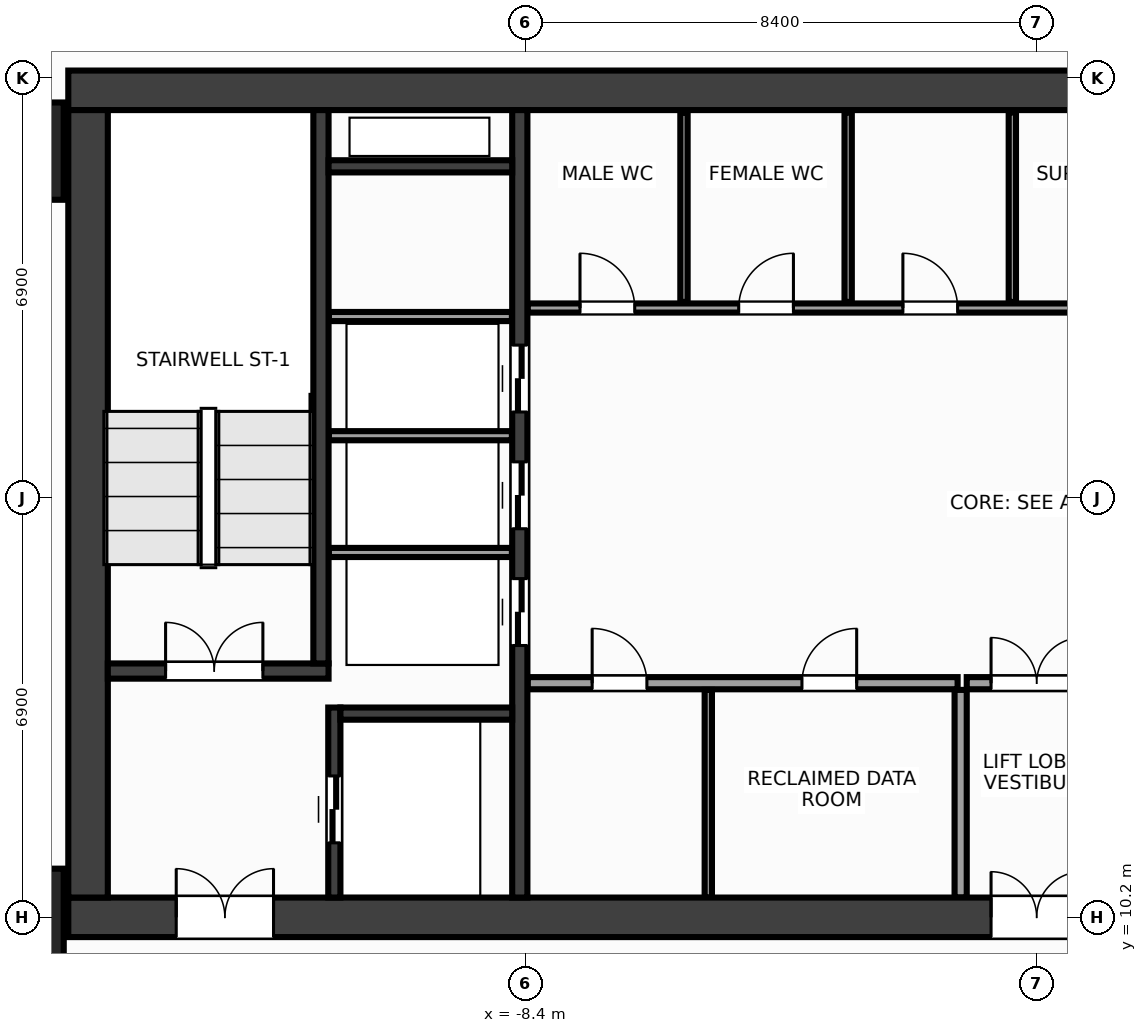
"""IFC4 building model, lengths in metres.
Left out: names, types, materials, properties, quantities, classifications, styles, units other than length and angle.
Written with IfcOpenShell. Run it as: python <this file> out.ifc"""

import sys

from ifc_helpers import new_model, si_unit, direction, frame, frame_2d, origin, origin_2d, place, context, subcontext, project, spatial, rectangle, extrude, source, transform, mapped, element, fill, save


model = new_model("IFC4")
c1 = context("Model", 3, precision=1e-05, world=origin(), true_north=direction((0.0, 1.0)))
c2 = subcontext(c1, "Body", "Model", "MODEL_VIEW")
j1 = project(units=[si_unit("LENGTHUNIT", "METRE"), si_unit("PLANEANGLEUNIT", "RADIAN")], contexts=[c1])
p1 = place(None, origin())
s1 = spatial("IfcSite", under=j1, at=p1, CompositionType="ELEMENT")
p2 = place(p1, origin())
s2 = spatial("IfcBuilding", under=s1, at=p2, CompositionType="ELEMENT")
p3 = place(p2, frame((0.0, 0.0, 138.8)))
s3 = spatial("IfcBuildingStorey", under=s2, at=p3, CompositionType="ELEMENT", Elevation=138.8)
m1 = source(origin(), c2, "Body", "SweptSolid", [
    extrude(rectangle(XDim=31.85, YDim=0.65, at=frame_2d((15.925, 0.0))), origin(), (0.0, 0.0, 1.0), 3.6),
])
p4 = place(p3, frame((-15.925, 23.8, 0.0), z_axis=(0.0, 0.0, 1.0), x_axis=(1.0, 0.0, 0.0)))
e1 = element("IfcWall", 1, at=p4, inside=s3, PredefinedType="SHEAR", context=c2, shape_type="MappedRepresentation", body=[
    mapped(m1, transform((0.0, 0.0, 0.0), x_axis=(1.0, 0.0, 0.0), y_axis=(0.0, 1.0, 0.0), z_axis=(0.0, 0.0, 1.0), scale=1.0)),
])
p5 = place(p3, frame((-15.925, 10.2, 0.0), z_axis=(0.0, 0.0, 1.0), x_axis=(1.0, 0.0, 0.0)))
e2 = element("IfcWall", 2, at=p5, inside=s3, PredefinedType="SHEAR", context=c2, shape_type="MappedRepresentation", body=[
    mapped(m1, transform((0.0, 0.0, 0.0), x_axis=(1.0, 0.0, 0.0), y_axis=(0.0, 1.0, 0.0), z_axis=(0.0, 0.0, 1.0), scale=1.0)),
])
p6 = place(p5, frame((1.775, 0.0, 0.0)))
e3 = element("IfcOpeningElement", 3, at=p6, cuts=e2, PredefinedType="OPENING", context=c2, shape_type="SweptSolid", body=[
    extrude(rectangle(XDim=1.6, YDim=2.15, at=frame_2d((0.8, 1.075))), frame((0.0, 0.337, 0.0), z_axis=(0.0, -1.0, 0.0), x_axis=(1.0, 0.0, 0.0)), (0.0, 0.0, 1.0), 0.674),
])
p7 = place(p5, frame((28.475, 0.0, 0.0)))
e4 = element("IfcOpeningElement", 4, at=p7, cuts=e2, PredefinedType="OPENING", context=c2, shape_type="SweptSolid", body=[
    extrude(rectangle(XDim=1.6, YDim=2.15, at=frame_2d((0.8, 1.075))), frame((0.0, 0.337, 0.0), z_axis=(0.0, -1.0, 0.0), x_axis=(1.0, 0.0, 0.0)), (0.0, 0.0, 1.0), 0.674),
])
p8 = place(p5, frame((15.175, 0.0, 0.0)))
e5 = element("IfcOpeningElement", 5, at=p8, cuts=e2, PredefinedType="OPENING", context=c2, shape_type="SweptSolid", body=[
    extrude(rectangle(XDim=1.5, YDim=2.2, at=frame_2d((0.75, 1.1))), frame((0.0, 0.337, 0.0), z_axis=(0.0, -1.0, 0.0), x_axis=(1.0, 0.0, 0.0)), (0.0, 0.0, 1.0), 0.674),
])
m2 = source(origin(), c2, "Body", "SweptSolid", [
    extrude(rectangle(XDim=12.95, YDim=0.65, at=frame_2d((6.475, 0.0))), origin(), (0.0, 0.0, 1.0), 3.6),
])
p9 = place(p3, frame((-15.6, 10.525, 0.0), z_axis=(0.0, 0.0, 1.0), x_axis=(0.0, 1.0, 0.0)))
e6 = element("IfcWall", 6, at=p9, inside=s3, PredefinedType="SHEAR", context=c2, shape_type="MappedRepresentation", body=[
    mapped(m2, transform((0.0, 0.0, 0.0), x_axis=(1.0, 0.0, 0.0), y_axis=(0.0, 1.0, 0.0), z_axis=(0.0, 0.0, 1.0), scale=1.0)),
])
m3 = source(origin(), c2, "Body", "SweptSolid", [
    extrude(rectangle(XDim=12.95, YDim=0.25, at=frame_2d((6.475, 0.0))), origin(), (0.0, 0.0, 1.0), 3.6),
])
p10 = place(p3, frame((-8.5, 10.525, 0.0), z_axis=(0.0, 0.0, 1.0), x_axis=(0.0, 1.0, 0.0)))
e7 = element("IfcWall", 7, at=p10, inside=s3, PredefinedType="SHEAR", context=c2, shape_type="MappedRepresentation", body=[
    mapped(m3, transform((0.0, 0.0, 0.0), x_axis=(1.0, 0.0, 0.0), y_axis=(0.0, 1.0, 0.0), z_axis=(0.0, 0.0, 1.0), scale=1.0)),
])
p11 = place(p10, frame((4.145, 0.0, 0.0)))
e8 = element("IfcOpeningElement", 8, at=p11, cuts=e7, PredefinedType="OPENING", context=c2, shape_type="SweptSolid", body=[
    extrude(rectangle(XDim=1.1, YDim=2.15, at=frame_2d((0.55, 1.075))), frame((0.0, 0.137, 0.0), z_axis=(0.0, -1.0, 0.0), x_axis=(1.0, 0.0, 0.0)), (0.0, 0.0, 1.0), 0.274),
])
p12 = place(p10, frame((6.065, 0.0, 0.0)))
e9 = element("IfcOpeningElement", 9, at=p12, cuts=e7, PredefinedType="OPENING", context=c2, shape_type="SweptSolid", body=[
    extrude(rectangle(XDim=1.1, YDim=2.15, at=frame_2d((0.55, 1.075))), frame((0.0, 0.137, 0.0), z_axis=(0.0, -1.0, 0.0), x_axis=(1.0, 0.0, 0.0)), (0.0, 0.0, 1.0), 0.274),
])
p13 = place(p10, frame((7.985, 0.0, 0.0)))
e10 = element("IfcOpeningElement", 10, at=p13, cuts=e7, PredefinedType="OPENING", context=c2, shape_type="SweptSolid", body=[
    extrude(rectangle(XDim=1.1, YDim=2.15, at=frame_2d((0.55, 1.075))), frame((0.0, 0.137, 0.0), z_axis=(0.0, -1.0, 0.0), x_axis=(1.0, 0.0, 0.0)), (0.0, 0.0, 1.0), 0.274),
])
m4 = source(origin(), c2, "Body", "SweptSolid", [
    extrude(rectangle(XDim=3.63, YDim=0.25, at=frame_2d((1.815, 0.0))), origin(), (0.0, 0.0, 1.0), 3.6),
])
p14 = place(p3, frame((-15.275, 14.25, 0.0), z_axis=(0.0, 0.0, 1.0), x_axis=(1.0, 0.0, 0.0)))
e11 = element("IfcWall", 11, at=p14, inside=s3, PredefinedType="SHEAR", context=c2, shape_type="MappedRepresentation", body=[
    mapped(m4, transform((0.0, 0.0, 0.0), x_axis=(1.0, 0.0, 0.0), y_axis=(0.0, 1.0, 0.0), z_axis=(0.0, 0.0, 1.0), scale=1.0)),
])
p15 = place(p14, frame((0.95, 0.0, 0.0)))
e12 = element("IfcOpeningElement", 12, at=p15, cuts=e11, PredefinedType="OPENING", context=c2, shape_type="SweptSolid", body=[
    extrude(rectangle(XDim=1.6, YDim=2.15, at=frame_2d((0.8, 1.075))), frame((0.0, 0.137, 0.0), z_axis=(0.0, -1.0, 0.0), x_axis=(1.0, 0.0, 0.0)), (0.0, 0.0, 1.0), 0.274),
])
m5 = source(origin(), c2, "Body", "SweptSolid", [
    extrude(rectangle(XDim=9.1, YDim=0.25, at=frame_2d((4.55, 0.0))), origin(), (0.0, 0.0, 1.0), 3.6),
])
p16 = place(p3, frame((-11.77, 14.375, 0.0), z_axis=(0.0, 0.0, 1.0), x_axis=(0.0, 1.0, 0.0)))
e13 = element("IfcWall", 13, at=p16, inside=s3, PredefinedType="SHEAR", context=c2, shape_type="MappedRepresentation", body=[
    mapped(m5, transform((0.0, 0.0, 0.0), x_axis=(1.0, 0.0, 0.0), y_axis=(0.0, 1.0, 0.0), z_axis=(0.0, 0.0, 1.0), scale=1.0)),
])
m6 = source(origin(), c2, "Body", "SweptSolid", [
    extrude(rectangle(XDim=3.125, YDim=0.2, at=frame_2d((1.562, 0.0))), origin(), (0.0, 0.0, 1.0), 3.6),
])
p17 = place(p3, frame((-11.55, 10.525, 0.0), z_axis=(0.0, 0.0, 1.0), x_axis=(0.0, 1.0, 0.0)))
e14 = element("IfcWall", 14, at=p17, inside=s3, PredefinedType="SHEAR", context=c2, shape_type="MappedRepresentation", body=[
    mapped(m6, transform((0.0, 0.0, 0.0), x_axis=(1.0, 0.0, 0.0), y_axis=(0.0, 1.0, 0.0), z_axis=(0.0, 0.0, 1.0), scale=1.0)),
])
p18 = place(p17, frame((0.9, 0.0, 0.0)))
e15 = element("IfcOpeningElement", 15, at=p18, cuts=e14, PredefinedType="OPENING", context=c2, shape_type="SweptSolid", body=[
    extrude(rectangle(XDim=1.1, YDim=2.15, at=frame_2d((0.55, 1.075))), frame((0.0, 0.112, 0.0), z_axis=(0.0, -1.0, 0.0), x_axis=(1.0, 0.0, 0.0)), (0.0, 0.0, 1.0), 0.224),
])
m7 = source(origin(), c2, "Body", "SweptSolid", [
    extrude(rectangle(XDim=2.825, YDim=0.2, at=frame_2d((1.413, 0.0))), origin(), (0.0, 0.0, 1.0), 3.6),
])
p19 = place(p3, frame((-11.45, 13.55, 0.0), z_axis=(0.0, 0.0, 1.0), x_axis=(1.0, 0.0, 0.0)))
e16 = element("IfcWall", 16, at=p19, inside=s3, PredefinedType="SHEAR", context=c2, shape_type="MappedRepresentation", body=[
    mapped(m7, transform((0.0, 0.0, 0.0), x_axis=(1.0, 0.0, 0.0), y_axis=(0.0, 1.0, 0.0), z_axis=(0.0, 0.0, 1.0), scale=1.0)),
])
m8 = source(origin(), c2, "Body", "SweptSolid", [
    extrude(rectangle(XDim=3.02, YDim=0.2, at=frame_2d((1.51, 0.0))), origin(), (0.0, 0.0, 1.0), 3.6),
])
p20 = place(p3, frame((-11.645, 22.55, 0.0), z_axis=(0.0, 0.0, 1.0), x_axis=(1.0, 0.0, 0.0)))
e17 = element("IfcWall", 17, at=p20, inside=s3, PredefinedType="SHEAR", context=c2, shape_type="MappedRepresentation", body=[
    mapped(m8, transform((0.0, 0.0, 0.0), x_axis=(1.0, 0.0, 0.0), y_axis=(0.0, 1.0, 0.0), z_axis=(0.0, 0.0, 1.0), scale=1.0)),
])
m9 = source(origin(), c2, "Body", "SweptSolid", [
    extrude(rectangle(XDim=1.6, YDim=1.6, at=origin_2d()), origin(), (0.0, 0.0, 1.0), 3.6),
])
for number, where, z_axis, x_axis in (
    (18, (-16.8, 10.2, 0.0), (0.0, 0.0, 1.0), (1.0, 0.0, 0.0)),
    (19, (-16.8, 22.8, 0.0), (0.0, 0.0, 1.0), (1.0, 0.0, 0.0)),
):
    element("IfcColumn", number, at=place(p3, frame(where, z_axis=z_axis, x_axis=x_axis)), inside=s3, PredefinedType="COLUMN", context=c2, shape_type="MappedRepresentation", body=[
        mapped(m9, transform((0.0, 0.0, 0.0), x_axis=(1.0, 0.0, 0.0), y_axis=(0.0, 1.0, 0.0), z_axis=(0.0, 0.0, 1.0), scale=1.0)),
    ])
m10 = source(origin(), c2, "Body", "SweptSolid", [
    extrude(rectangle(XDim=3.01, YDim=0.15, at=frame_2d((1.505, 0.0))), origin(), (0.0, 0.0, 1.0), 3.38),
])
for number, where, z_axis, x_axis in (
    (20, (-11.64, 16.2, 0.0), (0.0, 0.0, 1.0), (1.0, 0.0, 0.0)),
    (21, (-11.64, 18.12, 0.0), (0.0, 0.0, 1.0), (1.0, 0.0, 0.0)),
    (22, (-11.64, 20.08, 0.0), (0.0, 0.0, 1.0), (1.0, 0.0, 0.0)),
):
    element("IfcWall", number, at=place(p3, frame(where, z_axis=z_axis, x_axis=x_axis)), inside=s3, PredefinedType="PARTITIONING", context=c2, shape_type="MappedRepresentation", body=[
        mapped(m10, transform((0.0, 0.0, 0.0), x_axis=(1.0, 0.0, 0.0), y_axis=(0.0, 1.0, 0.0), z_axis=(0.0, 0.0, 1.0), scale=1.0)),
    ])
m11 = source(origin(), c2, "Body", "SweptSolid", [
    extrude(rectangle(XDim=7.07, YDim=0.2, at=frame_2d((3.535, 0.0))), origin(), (0.0, 0.0, 1.0), 3.38),
])
p21 = place(p3, frame((-8.37, 14.05, 0.0), z_axis=(0.0, 0.0, 1.0), x_axis=(1.0, 0.0, 0.0)))
e23 = element("IfcWall", 23, at=p21, inside=s3, PredefinedType="PARTITIONING", context=c2, shape_type="MappedRepresentation", body=[
    mapped(m11, transform((0.0, 0.0, 0.0), x_axis=(1.0, 0.0, 0.0), y_axis=(0.0, 1.0, 0.0), z_axis=(0.0, 0.0, 1.0), scale=1.0)),
])
p22 = place(p21, frame((1.06, 0.0, 0.0)))
e24 = element("IfcOpeningElement", 24, at=p22, cuts=e23, PredefinedType="OPENING", context=c2, shape_type="SweptSolid", body=[
    extrude(rectangle(XDim=0.9, YDim=2.15, at=frame_2d((0.45, 1.075))), frame((0.0, 0.112, 0.0), z_axis=(0.0, -1.0, 0.0), x_axis=(1.0, 0.0, 0.0)), (0.0, 0.0, 1.0), 0.224),
])
p23 = place(p21, frame((4.51, 0.0, 0.0)))
e25 = element("IfcOpeningElement", 25, at=p23, cuts=e23, PredefinedType="OPENING", context=c2, shape_type="SweptSolid", body=[
    extrude(rectangle(XDim=0.9, YDim=2.15, at=frame_2d((0.45, 1.075))), frame((0.0, 0.112, 0.0), z_axis=(0.0, -1.0, 0.0), x_axis=(1.0, 0.0, 0.0)), (0.0, 0.0, 1.0), 0.224),
])
m12 = source(origin(), c2, "Body", "SweptSolid", [
    extrude(rectangle(XDim=3.415, YDim=0.2, at=frame_2d((1.708, 0.0))), origin(), (0.0, 0.0, 1.0), 3.38),
])
p24 = place(p3, frame((-1.25, 10.525, 0.0), z_axis=(0.0, 0.0, 1.0), x_axis=(0.0, 1.0, 0.0)))
e26 = element("IfcWall", 26, at=p24, inside=s3, PredefinedType="PARTITIONING", context=c2, shape_type="MappedRepresentation", body=[
    mapped(m12, transform((0.0, 0.0, 0.0), x_axis=(1.0, 0.0, 0.0), y_axis=(0.0, 1.0, 0.0), z_axis=(0.0, 0.0, 1.0), scale=1.0)),
])
m13 = source(origin(), c2, "Body", "SweptSolid", [
    extrude(rectangle(XDim=2.3, YDim=0.2, at=frame_2d((1.15, 0.0))), origin(), (0.0, 0.0, 1.0), 3.38),
])
p25 = place(p3, frame((-1.15, 14.05, 0.0), z_axis=(0.0, 0.0, 1.0), x_axis=(1.0, 0.0, 0.0)))
e27 = element("IfcWall", 27, at=p25, inside=s3, PredefinedType="PARTITIONING", context=c2, shape_type="MappedRepresentation", body=[
    mapped(m13, transform((0.0, 0.0, 0.0), x_axis=(1.0, 0.0, 0.0), y_axis=(0.0, 1.0, 0.0), z_axis=(0.0, 0.0, 1.0), scale=1.0)),
])
p26 = place(p25, frame((0.4, 0.0, 0.0)))
e28 = element("IfcOpeningElement", 28, at=p26, cuts=e27, PredefinedType="OPENING", context=c2, shape_type="SweptSolid", body=[
    extrude(rectangle(XDim=1.5, YDim=2.2, at=frame_2d((0.75, 1.1))), frame((0.0, 0.112, 0.0), z_axis=(0.0, -1.0, 0.0), x_axis=(1.0, 0.0, 0.0)), (0.0, 0.0, 1.0), 0.224),
])
m14 = source(origin(), c2, "Body", "SweptSolid", [
    extrude(rectangle(XDim=14.59, YDim=0.15, at=frame_2d((7.295, 0.0))), origin(), (0.0, 0.0, 1.0), 3.38),
])
p27 = place(p3, frame((-8.37, 20.22, 0.0), z_axis=(0.0, 0.0, 1.0), x_axis=(1.0, 0.0, 0.0)))
e29 = element("IfcWall", 29, at=p27, inside=s3, PredefinedType="PARTITIONING", context=c2, shape_type="MappedRepresentation", body=[
    mapped(m14, transform((0.0, 0.0, 0.0), x_axis=(1.0, 0.0, 0.0), y_axis=(0.0, 1.0, 0.0), z_axis=(0.0, 0.0, 1.0), scale=1.0)),
])
p28 = place(p27, frame((0.86, 0.0, 0.0)))
e30 = element("IfcOpeningElement", 30, at=p28, cuts=e29, PredefinedType="OPENING", context=c2, shape_type="SweptSolid", body=[
    extrude(rectangle(XDim=0.9, YDim=2.15, at=frame_2d((0.45, 1.075))), frame((0.0, 0.087, 0.0), z_axis=(0.0, -1.0, 0.0), x_axis=(1.0, 0.0, 0.0)), (0.0, 0.0, 1.0), 0.174),
])
p29 = place(p27, frame((3.47, 0.0, 0.0)))
e31 = element("IfcOpeningElement", 31, at=p29, cuts=e29, PredefinedType="OPENING", context=c2, shape_type="SweptSolid", body=[
    extrude(rectangle(XDim=0.9, YDim=2.15, at=frame_2d((0.45, 1.075))), frame((0.0, 0.087, 0.0), z_axis=(0.0, -1.0, 0.0), x_axis=(1.0, 0.0, 0.0)), (0.0, 0.0, 1.0), 0.174),
])
p30 = place(p27, frame((6.17, 0.0, 0.0)))
e32 = element("IfcOpeningElement", 32, at=p30, cuts=e29, PredefinedType="OPENING", context=c2, shape_type="SweptSolid", body=[
    extrude(rectangle(XDim=0.9, YDim=2.15, at=frame_2d((0.45, 1.075))), frame((0.0, 0.087, 0.0), z_axis=(0.0, -1.0, 0.0), x_axis=(1.0, 0.0, 0.0)), (0.0, 0.0, 1.0), 0.174),
])
p31 = place(p27, frame((9.07, 0.0, 0.0)))
e33 = element("IfcOpeningElement", 33, at=p31, cuts=e29, PredefinedType="OPENING", context=c2, shape_type="SweptSolid", body=[
    extrude(rectangle(XDim=0.9, YDim=2.15, at=frame_2d((0.45, 1.075))), frame((0.0, 0.087, 0.0), z_axis=(0.0, -1.0, 0.0), x_axis=(1.0, 0.0, 0.0)), (0.0, 0.0, 1.0), 0.174),
])
p32 = place(p27, frame((12.32, 0.0, 0.0)))
e34 = element("IfcOpeningElement", 34, at=p32, cuts=e29, PredefinedType="OPENING", context=c2, shape_type="SweptSolid", body=[
    extrude(rectangle(XDim=0.9, YDim=2.15, at=frame_2d((0.45, 1.075))), frame((0.0, 0.087, 0.0), z_axis=(0.0, -1.0, 0.0), x_axis=(1.0, 0.0, 0.0)), (0.0, 0.0, 1.0), 0.174),
])
m15 = source(origin(), c2, "Body", "SweptSolid", [
    extrude(rectangle(XDim=3.415, YDim=0.12, at=frame_2d((1.708, 0.0))), origin(), (0.0, 0.0, 1.0), 3.38),
])
p33 = place(p3, frame((-5.4, 10.525, 0.0), z_axis=(0.0, 0.0, 1.0), x_axis=(0.0, 1.0, 0.0)))
e35 = element("IfcWall", 35, at=p33, inside=s3, PredefinedType="PARTITIONING", context=c2, shape_type="MappedRepresentation", body=[
    mapped(m15, transform((0.0, 0.0, 0.0), x_axis=(1.0, 0.0, 0.0), y_axis=(0.0, 1.0, 0.0), z_axis=(0.0, 0.0, 1.0), scale=1.0)),
])
m16 = source(origin(), c2, "Body", "SweptSolid", [
    extrude(rectangle(XDim=3.115, YDim=0.12, at=frame_2d((1.558, 0.0))), origin(), (0.0, 0.0, 1.0), 3.38),
])
for number, where, z_axis, x_axis in (
    (36, (-5.8, 20.32, 0.0), (0.0, 0.0, 1.0), (0.0, 1.0, 0.0)),
    (37, (-3.1, 20.32, 0.0), (0.0, 0.0, 1.0), (0.0, 1.0, 0.0)),
    (38, (-0.4, 20.32, 0.0), (0.0, 0.0, 1.0), (0.0, 1.0, 0.0)),
):
    element("IfcWall", number, at=place(p3, frame(where, z_axis=z_axis, x_axis=x_axis)), inside=s3, PredefinedType="PARTITIONING", context=c2, shape_type="MappedRepresentation", body=[
        mapped(m16, transform((0.0, 0.0, 0.0), x_axis=(1.0, 0.0, 0.0), y_axis=(0.0, 1.0, 0.0), z_axis=(0.0, 0.0, 1.0), scale=1.0)),
    ])
m17 = source(origin(), c2, "Body", "SweptSolid", [
    extrude(rectangle(XDim=1.6, YDim=2.15, at=frame_2d((0.8, 1.075))), frame((0.0, 0.025, 0.0), z_axis=(0.0, -1.0, 0.0), x_axis=(1.0, 0.0, 0.0)), (0.0, 0.0, 1.0), 0.05),
])
p34 = place(p15, origin())
e39 = element("IfcDoor", 39, at=p34, inside=s3, OperationType="DOUBLE_DOOR_SINGLE_SWING", PredefinedType="DOOR", context=c2, shape_type="MappedRepresentation", body=[
    mapped(m17, transform((0.0, 0.0, 0.0), x_axis=(1.0, 0.0, 0.0), y_axis=(0.0, 1.0, 0.0), z_axis=(0.0, 0.0, 1.0), scale=1.0)),
])
fill(e12, e39)
p35 = place(p6, origin())
e40 = element("IfcDoor", 40, at=p35, inside=s3, OperationType="DOUBLE_DOOR_SINGLE_SWING", PredefinedType="DOOR", context=c2, shape_type="MappedRepresentation", body=[
    mapped(m17, transform((0.0, 0.0, 0.0), x_axis=(1.0, 0.0, 0.0), y_axis=(0.0, 1.0, 0.0), z_axis=(0.0, 0.0, 1.0), scale=1.0)),
])
fill(e3, e40)
m18 = source(origin(), c2, "Body", "SweptSolid", [
    extrude(rectangle(XDim=1.1, YDim=2.15, at=frame_2d((0.55, 1.075))), frame((0.0, 0.025, 0.0), z_axis=(0.0, -1.0, 0.0), x_axis=(1.0, 0.0, 0.0)), (0.0, 0.0, 1.0), 0.05),
])
p36 = place(p18, origin())
e41 = element("IfcDoor", 41, at=p36, inside=s3, OperationType="DOUBLE_DOOR_SLIDING", PredefinedType="DOOR", context=c2, shape_type="MappedRepresentation", body=[
    mapped(m18, transform((0.0, 0.0, 0.0), x_axis=(1.0, 0.0, 0.0), y_axis=(0.0, 1.0, 0.0), z_axis=(0.0, 0.0, 1.0), scale=1.0)),
])
fill(e15, e41)
p37 = place(p11, origin())
e42 = element("IfcDoor", 42, at=p37, inside=s3, OperationType="DOUBLE_DOOR_SLIDING", PredefinedType="DOOR", context=c2, shape_type="MappedRepresentation", body=[
    mapped(m18, transform((0.0, 0.0, 0.0), x_axis=(1.0, 0.0, 0.0), y_axis=(0.0, 1.0, 0.0), z_axis=(0.0, 0.0, 1.0), scale=1.0)),
])
fill(e8, e42)
p38 = place(p12, origin())
e43 = element("IfcDoor", 43, at=p38, inside=s3, OperationType="DOUBLE_DOOR_SLIDING", PredefinedType="DOOR", context=c2, shape_type="MappedRepresentation", body=[
    mapped(m18, transform((0.0, 0.0, 0.0), x_axis=(1.0, 0.0, 0.0), y_axis=(0.0, 1.0, 0.0), z_axis=(0.0, 0.0, 1.0), scale=1.0)),
])
fill(e9, e43)
p39 = place(p13, origin())
e44 = element("IfcDoor", 44, at=p39, inside=s3, OperationType="DOUBLE_DOOR_SLIDING", PredefinedType="DOOR", context=c2, shape_type="MappedRepresentation", body=[
    mapped(m18, transform((0.0, 0.0, 0.0), x_axis=(1.0, 0.0, 0.0), y_axis=(0.0, 1.0, 0.0), z_axis=(0.0, 0.0, 1.0), scale=1.0)),
])
fill(e10, e44)
m19 = source(origin(), c2, "Body", "SweptSolid", [
    extrude(rectangle(XDim=0.9, YDim=2.15, at=frame_2d((0.45, 1.075))), frame((0.0, 0.025, 0.0), z_axis=(0.0, -1.0, 0.0), x_axis=(1.0, 0.0, 0.0)), (0.0, 0.0, 1.0), 0.05),
])
p40 = place(p22, origin())
e45 = element("IfcDoor", 45, at=p40, inside=s3, OperationType="SINGLE_SWING_LEFT", PredefinedType="DOOR", context=c2, shape_type="MappedRepresentation", body=[
    mapped(m19, transform((0.0, 0.0, 0.0), x_axis=(1.0, 0.0, 0.0), y_axis=(0.0, 1.0, 0.0), z_axis=(0.0, 0.0, 1.0), scale=1.0)),
])
fill(e24, e45)
p41 = place(p23, origin())
e46 = element("IfcDoor", 46, at=p41, inside=s3, OperationType="SINGLE_SWING_RIGHT", PredefinedType="DOOR", context=c2, shape_type="MappedRepresentation", body=[
    mapped(m19, transform((0.0, 0.0, 0.0), x_axis=(1.0, 0.0, 0.0), y_axis=(0.0, 1.0, 0.0), z_axis=(0.0, 0.0, 1.0), scale=1.0)),
])
fill(e25, e46)
m20 = source(origin(), c2, "Body", "SweptSolid", [
    extrude(rectangle(XDim=1.5, YDim=2.2, at=frame_2d((0.75, 1.1))), frame((0.0, 0.025, 0.0), z_axis=(0.0, -1.0, 0.0), x_axis=(1.0, 0.0, 0.0)), (0.0, 0.0, 1.0), 0.05),
])
p42 = place(p26, origin())
e47 = element("IfcDoor", 47, at=p42, inside=s3, OperationType="DOUBLE_DOOR_SINGLE_SWING", PredefinedType="DOOR", context=c2, shape_type="MappedRepresentation", body=[
    mapped(m20, transform((0.0, 0.0, 0.0), x_axis=(1.0, 0.0, 0.0), y_axis=(0.0, 1.0, 0.0), z_axis=(0.0, 0.0, 1.0), scale=1.0)),
])
fill(e28, e47)
p43 = place(p8, origin())
e48 = element("IfcDoor", 48, at=p43, inside=s3, OperationType="DOUBLE_DOOR_SINGLE_SWING", PredefinedType="DOOR", context=c2, shape_type="MappedRepresentation", body=[
    mapped(m20, transform((0.0, 0.0, 0.0), x_axis=(1.0, 0.0, 0.0), y_axis=(0.0, 1.0, 0.0), z_axis=(0.0, 0.0, 1.0), scale=1.0)),
])
fill(e5, e48)
p44 = place(p28, origin())
e49 = element("IfcDoor", 49, at=p44, inside=s3, OperationType="SINGLE_SWING_LEFT", PredefinedType="DOOR", context=c2, shape_type="MappedRepresentation", body=[
    mapped(m19, transform((0.0, 0.0, 0.0), x_axis=(1.0, 0.0, 0.0), y_axis=(0.0, 1.0, 0.0), z_axis=(0.0, 0.0, 1.0), scale=1.0)),
])
fill(e30, e49)
p45 = place(p29, origin())
e50 = element("IfcDoor", 50, at=p45, inside=s3, OperationType="SINGLE_SWING_RIGHT", PredefinedType="DOOR", context=c2, shape_type="MappedRepresentation", body=[
    mapped(m19, transform((0.0, 0.0, 0.0), x_axis=(1.0, 0.0, 0.0), y_axis=(0.0, 1.0, 0.0), z_axis=(0.0, 0.0, 1.0), scale=1.0)),
])
fill(e31, e50)
p46 = place(p30, origin())
e51 = element("IfcDoor", 51, at=p46, inside=s3, OperationType="SINGLE_SWING_LEFT", PredefinedType="DOOR", context=c2, shape_type="MappedRepresentation", body=[
    mapped(m19, transform((0.0, 0.0, 0.0), x_axis=(1.0, 0.0, 0.0), y_axis=(0.0, 1.0, 0.0), z_axis=(0.0, 0.0, 1.0), scale=1.0)),
])
fill(e32, e51)
save(model, sys.argv[1])
